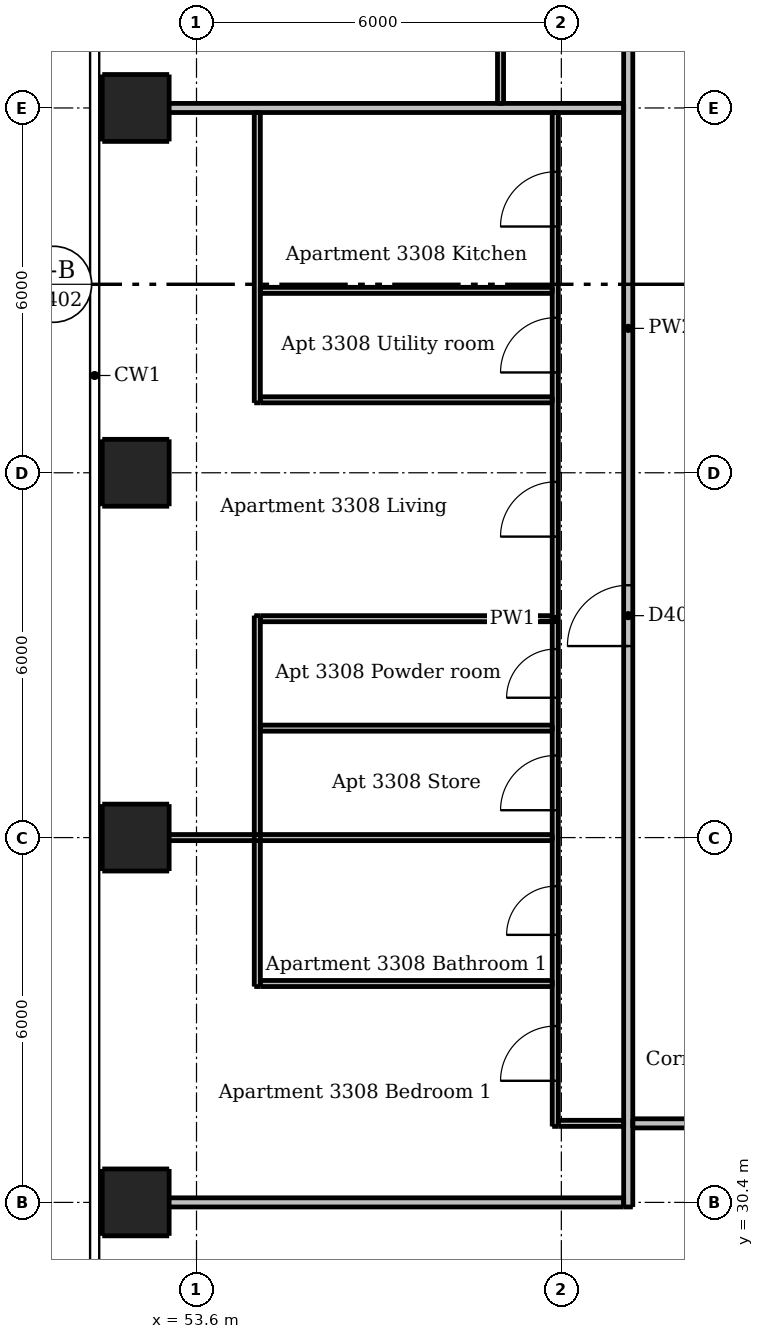
"""IFC4 building model, lengths in metres.
Left out: names, types, materials, properties, quantities, classifications, styles, units other than length and angle.
Written with IfcOpenShell. Run it as: python <this file> out.ifc"""

import sys

from ifc_helpers import new_model, si_unit, direction, frame, frame_2d, origin, origin_2d, place, context, subcontext, project, spatial, rectangle, extrude, element, fill, save


model = new_model("IFC4")
c1 = context("Model", 3, precision=1e-05, world=origin(), true_north=direction((0.0, 1.0)))
c2 = subcontext(c1, "Body", "Model", "MODEL_VIEW")
j1 = project(units=[si_unit("LENGTHUNIT", "METRE"), si_unit("PLANEANGLEUNIT", "RADIAN")], contexts=[c1])
p1 = place(None, origin())
s1 = spatial("IfcSite", under=j1, at=p1, CompositionType="ELEMENT")
p2 = place(p1, origin())
s2 = spatial("IfcBuilding", under=s1, at=p2, CompositionType="ELEMENT")
p3 = place(p2, frame((0.0, 0.0, 121.6)))
s3 = spatial("IfcBuildingStorey", under=s2, at=p3, CompositionType="ELEMENT", Elevation=121.6)
for number, where, z_axis, x_axis in (
    (1, (52.6, 30.4, 0.0), (0.0, 0.0, 1.0), (1.0, 0.0, 0.0)),
    (2, (52.6, 36.4, 0.0), (0.0, 0.0, 1.0), (1.0, 0.0, 0.0)),
    (3, (52.6, 42.4, 0.0), (0.0, 0.0, 1.0), (1.0, 0.0, 0.0)),
    (4, (52.6, 48.4, 0.0), (0.0, 0.0, 1.0), (1.0, 0.0, 0.0)),
):
    element("IfcColumn", number, at=place(p3, frame(where, z_axis=z_axis, x_axis=x_axis)), inside=s3, PredefinedType="COLUMN", context=c2, shape_type="SweptSolid", body=[
        extrude(rectangle(XDim=1.1, YDim=1.1, at=origin_2d()), origin(), (0.0, 0.0, 1.0), 2.95),
    ])
p4 = place(p3, frame((54.6, 33.95, 0.0), z_axis=(0.0, 0.0, 1.0), x_axis=(0.0, 1.0, 0.0)))
e5 = element("IfcWall", 5, at=p4, inside=s3, PredefinedType="PARTITIONING", context=c2, shape_type="SweptSolid", body=[
    extrude(rectangle(XDim=6.1, YDim=0.1, at=frame_2d((3.05, 0.0))), origin(), (0.0, 0.0, 1.0), 2.95),
])
p5 = place(p3, frame((54.6, 43.55, 0.0), z_axis=(0.0, 0.0, 1.0), x_axis=(0.0, 1.0, 0.0)))
e6 = element("IfcWall", 6, at=p5, inside=s3, PredefinedType="PARTITIONING", context=c2, shape_type="SweptSolid", body=[
    extrude(rectangle(XDim=4.775, YDim=0.1, at=frame_2d((2.387, 0.0))), origin(), (0.0, 0.0, 1.0), 2.95),
])
p6 = place(p3, frame((58.6, 54.35, 0.0), z_axis=(0.0, 0.0, 1.0), x_axis=(0.0, -1.0, 0.0)))
e7 = element("IfcWall", 7, at=p6, inside=s3, PredefinedType="PARTITIONING", context=c2, shape_type="SweptSolid", body=[
    extrude(rectangle(XDim=5.875, YDim=0.1, at=frame_2d((2.938, 0.0))), origin(), (0.0, 0.0, 1.0), 2.95),
])
p7 = place(p6, frame((3.75, 0.0, 0.0)))
e8 = element("IfcOpeningElement", 8, at=p7, cuts=e7, PredefinedType="OPENING", context=c2, shape_type="SweptSolid", body=[
    extrude(rectangle(XDim=0.8, YDim=2.1, at=frame_2d((0.4, 1.05))), frame((0.0, 0.06, 0.0), z_axis=(0.0, -1.0, 0.0), x_axis=(1.0, 0.0, 0.0)), (0.0, 0.0, 1.0), 0.12),
])
p8 = place(p3, frame((59.5, 31.65, 0.0), z_axis=(0.0, 0.0, 1.0), x_axis=(0.0, 1.0, 0.0)))
e9 = element("IfcWall", 9, at=p8, inside=s3, PredefinedType="PARTITIONING", context=c2, shape_type="SweptSolid", body=[
    extrude(rectangle(XDim=16.675, YDim=0.1, at=frame_2d((8.337, 0.0))), origin(), (0.0, 0.0, 1.0), 2.332),
])
p9 = place(p8, frame((9.7, 0.0, 0.0)))
e10 = element("IfcOpeningElement", 10, at=p9, cuts=e9, PredefinedType="OPENING", context=c2, shape_type="SweptSolid", body=[
    extrude(rectangle(XDim=0.9, YDim=2.1, at=frame_2d((0.45, 1.05))), frame((0.0, 0.06, 0.0), z_axis=(0.0, -1.0, 0.0), x_axis=(1.0, 0.0, 0.0)), (0.0, 0.0, 1.0), 0.12),
])
p10 = place(p8, frame((14.8, 0.0, 0.0)))
e11 = element("IfcOpeningElement", 11, at=p10, cuts=e9, PredefinedType="OPENING", context=c2, shape_type="SweptSolid", body=[
    extrude(rectangle(XDim=0.9, YDim=2.1, at=frame_2d((0.45, 1.05))), frame((0.0, 0.06, 0.0), z_axis=(0.0, -1.0, 0.0), x_axis=(1.0, 0.0, 0.0)), (0.0, 0.0, 1.0), 0.12),
])
p11 = place(p8, frame((12.4, 0.0, 0.0)))
e12 = element("IfcOpeningElement", 12, at=p11, cuts=e9, PredefinedType="OPENING", context=c2, shape_type="SweptSolid", body=[
    extrude(rectangle(XDim=0.9, YDim=2.1, at=frame_2d((0.45, 1.05))), frame((0.0, 0.06, 0.0), z_axis=(0.0, -1.0, 0.0), x_axis=(1.0, 0.0, 0.0)), (0.0, 0.0, 1.0), 0.12),
])
p12 = place(p8, frame((5.2, 0.0, 0.0)))
e13 = element("IfcOpeningElement", 13, at=p12, cuts=e9, PredefinedType="OPENING", context=c2, shape_type="SweptSolid", body=[
    extrude(rectangle(XDim=0.9, YDim=2.1, at=frame_2d((0.45, 1.05))), frame((0.0, 0.06, 0.0), z_axis=(0.0, -1.0, 0.0), x_axis=(1.0, 0.0, 0.0)), (0.0, 0.0, 1.0), 0.12),
])
p13 = place(p8, frame((7.05, 0.0, 0.0)))
e14 = element("IfcOpeningElement", 14, at=p13, cuts=e9, PredefinedType="OPENING", context=c2, shape_type="SweptSolid", body=[
    extrude(rectangle(XDim=0.8, YDim=2.1, at=frame_2d((0.4, 1.05))), frame((0.0, 0.06, 0.0), z_axis=(0.0, -1.0, 0.0), x_axis=(1.0, 0.0, 0.0)), (0.0, 0.0, 1.0), 0.12),
])
p14 = place(p8, frame((0.75, 0.0, 0.0)))
e15 = element("IfcOpeningElement", 15, at=p14, cuts=e9, PredefinedType="OPENING", context=c2, shape_type="SweptSolid", body=[
    extrude(rectangle(XDim=0.9, YDim=2.1, at=frame_2d((0.45, 1.05))), frame((0.0, 0.06, 0.0), z_axis=(0.0, -1.0, 0.0), x_axis=(1.0, 0.0, 0.0)), (0.0, 0.0, 1.0), 0.12),
])
p15 = place(p8, frame((3.15, 0.0, 0.0)))
e16 = element("IfcOpeningElement", 16, at=p15, cuts=e9, PredefinedType="OPENING", context=c2, shape_type="SweptSolid", body=[
    extrude(rectangle(XDim=0.8, YDim=2.1, at=frame_2d((0.4, 1.05))), frame((0.0, 0.06, 0.0), z_axis=(0.0, -1.0, 0.0), x_axis=(1.0, 0.0, 0.0)), (0.0, 0.0, 1.0), 0.12),
])
for number, where, z_axis, x_axis in (
    (17, (54.65, 45.4, 0.0), (0.0, 0.0, 1.0), (1.0, 0.0, 0.0)),
    (18, (54.65, 43.6, 0.0), (0.0, 0.0, 1.0), (1.0, 0.0, 0.0)),
    (19, (54.65, 40.0, 0.0), (0.0, 0.0, 1.0), (1.0, 0.0, 0.0)),
    (20, (54.65, 38.2, 0.0), (0.0, 0.0, 1.0), (1.0, 0.0, 0.0)),
):
    element("IfcWall", number, at=place(p3, frame(where, z_axis=z_axis, x_axis=x_axis)), inside=s3, PredefinedType="PARTITIONING", context=c2, shape_type="SweptSolid", body=[
        extrude(rectangle(XDim=4.8, YDim=0.1, at=frame_2d((2.4, 0.0))), origin(), (0.0, 0.0, 1.0), 2.95),
    ])
p16 = place(p3, frame((52.0, 36.4, 0.0), z_axis=(0.0, 0.0, 1.0), x_axis=(1.0, 0.0, 0.0)))
e21 = element("IfcWall", 21, at=p16, inside=s3, PredefinedType="PARTITIONING", context=c2, shape_type="SweptSolid", body=[
    extrude(rectangle(XDim=7.45, YDim=0.1, at=frame_2d((3.725, 0.0))), origin(), (0.0, 0.0, 1.0), 2.332),
])
p17 = place(p3, frame((54.65, 34.0, 0.0), z_axis=(0.0, 0.0, 1.0), x_axis=(1.0, 0.0, 0.0)))
e22 = element("IfcWall", 22, at=p17, inside=s3, PredefinedType="PARTITIONING", context=c2, shape_type="SweptSolid", body=[
    extrude(rectangle(XDim=4.8, YDim=0.1, at=frame_2d((2.4, 0.0))), origin(), (0.0, 0.0, 1.0), 2.95),
])
p18 = place(p3, frame((59.55, 31.7, 0.0), z_axis=(0.0, 0.0, 1.0), x_axis=(1.0, 0.0, 0.0)))
e23 = element("IfcWall", 23, at=p18, inside=s3, PredefinedType="PARTITIONING", context=c2, shape_type="SweptSolid", body=[
    extrude(rectangle(XDim=1.075, YDim=0.1, at=frame_2d((0.538, 0.0))), origin(), (0.0, 0.0, 1.0), 2.95),
])
p19 = place(p3, frame((60.7, 30.325, 0.0), z_axis=(0.0, 0.0, 1.0), x_axis=(0.0, 1.0, 0.0)))
e24 = element("IfcWall", 24, at=p19, inside=s3, PredefinedType="PARTITIONING", context=c2, shape_type="SweptSolid", body=[
    extrude(rectangle(XDim=28.9, YDim=0.15, at=frame_2d((14.45, 0.0))), origin(), (0.0, 0.0, 1.0), 2.95),
])
p20 = place(p19, frame((9.225, 0.0, 0.0)))
e25 = element("IfcOpeningElement", 25, at=p20, cuts=e24, PredefinedType="OPENING", context=c2, shape_type="SweptSolid", body=[
    extrude(rectangle(XDim=1.0, YDim=2.1, at=frame_2d((0.5, 1.05))), frame((0.0, 0.085, 0.0), z_axis=(0.0, -1.0, 0.0), x_axis=(1.0, 0.0, 0.0)), (0.0, 0.0, 1.0), 0.17),
])
p21 = place(p19, frame((26.025, 0.0, 0.0)))
e26 = element("IfcOpeningElement", 26, at=p21, cuts=e24, PredefinedType="OPENING", context=c2, shape_type="SweptSolid", body=[
    extrude(rectangle(XDim=1.0, YDim=2.1, at=frame_2d((0.5, 1.05))), frame((0.0, 0.085, 0.0), z_axis=(0.0, -1.0, 0.0), x_axis=(1.0, 0.0, 0.0)), (0.0, 0.0, 1.0), 0.17),
])
p22 = place(p3, frame((52.0, 48.4, 0.0), z_axis=(0.0, 0.0, 1.0), x_axis=(1.0, 0.0, 0.0)))
e27 = element("IfcWall", 27, at=p22, inside=s3, PredefinedType="PARTITIONING", context=c2, shape_type="SweptSolid", body=[
    extrude(rectangle(XDim=8.625, YDim=0.15, at=frame_2d((4.312, 0.0))), origin(), (0.0, 0.0, 1.0), 2.332),
])
p23 = place(p3, frame((89.525, 31.7, 0.0), z_axis=(0.0, 0.0, 1.0), x_axis=(-1.0, 0.0, 0.0)))
e28 = element("IfcWall", 28, at=p23, inside=s3, PredefinedType="PARTITIONING", context=c2, shape_type="SweptSolid", body=[
    extrude(rectangle(XDim=28.75, YDim=0.15, at=frame_2d((14.375, 0.0))), origin(), (0.0, 0.0, 1.0), 2.95),
])
p24 = place(p23, frame((24.625, 0.0, 0.0)))
e29 = element("IfcOpeningElement", 29, at=p24, cuts=e28, PredefinedType="OPENING", context=c2, shape_type="SweptSolid", body=[
    extrude(rectangle(XDim=1.0, YDim=2.1, at=frame_2d((0.5, 1.05))), frame((0.0, 0.085, 0.0), z_axis=(0.0, -1.0, 0.0), x_axis=(1.0, 0.0, 0.0)), (0.0, 0.0, 1.0), 0.17),
])
p25 = place(p23, frame((5.425, 0.0, 0.0)))
e30 = element("IfcOpeningElement", 30, at=p25, cuts=e28, PredefinedType="OPENING", context=c2, shape_type="SweptSolid", body=[
    extrude(rectangle(XDim=1.0, YDim=2.1, at=frame_2d((0.5, 1.05))), frame((0.0, 0.085, 0.0), z_axis=(0.0, -1.0, 0.0), x_axis=(1.0, 0.0, 0.0)), (0.0, 0.0, 1.0), 0.17),
])
p26 = place(p3, frame((52.0, 30.4, 0.0), z_axis=(0.0, 0.0, 1.0), x_axis=(1.0, 0.0, 0.0)))
e31 = element("IfcWall", 31, at=p26, inside=s3, PredefinedType="PARTITIONING", context=c2, shape_type="SweptSolid", body=[
    extrude(rectangle(XDim=8.625, YDim=0.15, at=frame_2d((4.312, 0.0))), origin(), (0.0, 0.0, 1.0), 2.332),
])
p27 = place(p20, origin())
e32 = element("IfcDoor", 32, at=p27, inside=s3, OperationType="SINGLE_SWING_LEFT", PredefinedType="DOOR", context=c2, shape_type="SweptSolid", body=[
    extrude(rectangle(XDim=1.0, YDim=2.1, at=frame_2d((0.5, 1.05))), frame((0.0, 0.025, 0.0), z_axis=(0.0, -1.0, 0.0), x_axis=(1.0, 0.0, 0.0)), (0.0, 0.0, 1.0), 0.05),
])
fill(e25, e32)
p28 = place(p9, origin())
e33 = element("IfcDoor", 33, at=p28, inside=s3, OperationType="SINGLE_SWING_LEFT", PredefinedType="DOOR", context=c2, shape_type="SweptSolid", body=[
    extrude(rectangle(XDim=0.9, YDim=2.1, at=frame_2d((0.45, 1.05))), frame((0.0, 0.025, 0.0), z_axis=(0.0, -1.0, 0.0), x_axis=(1.0, 0.0, 0.0)), (0.0, 0.0, 1.0), 0.05),
])
fill(e10, e33)
p29 = place(p10, origin())
e34 = element("IfcDoor", 34, at=p29, inside=s3, OperationType="SINGLE_SWING_LEFT", PredefinedType="DOOR", context=c2, shape_type="SweptSolid", body=[
    extrude(rectangle(XDim=0.9, YDim=2.1, at=frame_2d((0.45, 1.05))), frame((0.0, 0.025, 0.0), z_axis=(0.0, -1.0, 0.0), x_axis=(1.0, 0.0, 0.0)), (0.0, 0.0, 1.0), 0.05),
])
fill(e11, e34)
p30 = place(p11, origin())
e35 = element("IfcDoor", 35, at=p30, inside=s3, OperationType="SINGLE_SWING_LEFT", PredefinedType="DOOR", context=c2, shape_type="SweptSolid", body=[
    extrude(rectangle(XDim=0.9, YDim=2.1, at=frame_2d((0.45, 1.05))), frame((0.0, 0.025, 0.0), z_axis=(0.0, -1.0, 0.0), x_axis=(1.0, 0.0, 0.0)), (0.0, 0.0, 1.0), 0.05),
])
fill(e12, e35)
p31 = place(p12, origin())
e36 = element("IfcDoor", 36, at=p31, inside=s3, OperationType="SINGLE_SWING_LEFT", PredefinedType="DOOR", context=c2, shape_type="SweptSolid", body=[
    extrude(rectangle(XDim=0.9, YDim=2.1, at=frame_2d((0.45, 1.05))), frame((0.0, 0.025, 0.0), z_axis=(0.0, -1.0, 0.0), x_axis=(1.0, 0.0, 0.0)), (0.0, 0.0, 1.0), 0.05),
])
fill(e13, e36)
p32 = place(p13, origin())
e37 = element("IfcDoor", 37, at=p32, inside=s3, OperationType="SINGLE_SWING_LEFT", PredefinedType="DOOR", context=c2, shape_type="SweptSolid", body=[
    extrude(rectangle(XDim=0.8, YDim=2.1, at=frame_2d((0.4, 1.05))), frame((0.0, 0.025, 0.0), z_axis=(0.0, -1.0, 0.0), x_axis=(1.0, 0.0, 0.0)), (0.0, 0.0, 1.0), 0.05),
])
fill(e14, e37)
p33 = place(p14, origin())
e38 = element("IfcDoor", 38, at=p33, inside=s3, OperationType="SINGLE_SWING_LEFT", PredefinedType="DOOR", context=c2, shape_type="SweptSolid", body=[
    extrude(rectangle(XDim=0.9, YDim=2.1, at=frame_2d((0.45, 1.05))), frame((0.0, 0.025, 0.0), z_axis=(0.0, -1.0, 0.0), x_axis=(1.0, 0.0, 0.0)), (0.0, 0.0, 1.0), 0.05),
])
fill(e15, e38)
p34 = place(p15, origin())
e39 = element("IfcDoor", 39, at=p34, inside=s3, OperationType="SINGLE_SWING_LEFT", PredefinedType="DOOR", context=c2, shape_type="SweptSolid", body=[
    extrude(rectangle(XDim=0.8, YDim=2.1, at=frame_2d((0.4, 1.05))), frame((0.0, 0.025, 0.0), z_axis=(0.0, -1.0, 0.0), x_axis=(1.0, 0.0, 0.0)), (0.0, 0.0, 1.0), 0.05),
])
fill(e16, e39)
save(model, sys.argv[1])
